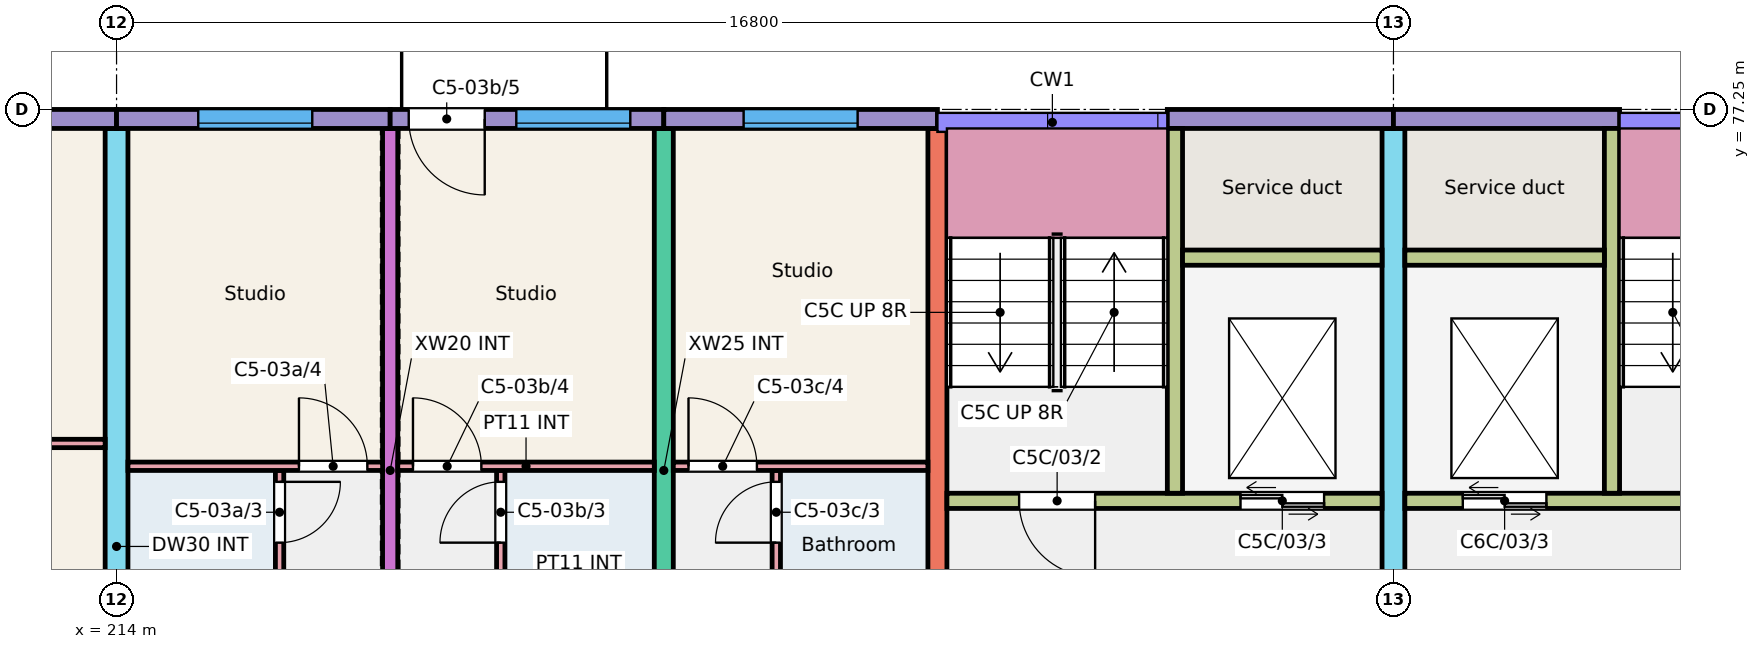
"""IFC4 building model, lengths in metres.
Left out: names, types, materials, properties, quantities, classifications, styles, units other than length and angle.
Written with IfcOpenShell. Run it as: python <this file> out.ifc"""

import sys

from ifc_helpers import new_model, si_unit, direction, frame, frame_2d, origin, place, context, subcontext, project, spatial, rectangle, extrude, element, fill, save


model = new_model("IFC4")
c1 = context("Model", 3, precision=1e-05, world=origin(), true_north=direction((0.0, 1.0)))
c2 = subcontext(c1, "Body", "Model", "MODEL_VIEW")
j1 = project(units=[si_unit("LENGTHUNIT", "METRE"), si_unit("PLANEANGLEUNIT", "RADIAN")], contexts=[c1])
p1 = place(None, origin())
s1 = spatial("IfcSite", under=j1, at=p1, CompositionType="ELEMENT")
p2 = place(p1, origin())
s2 = spatial("IfcBuilding", under=s1, at=p2, CompositionType="ELEMENT")
p3 = place(p2, frame((0.0, 0.0, 9.0)))
s3 = spatial("IfcBuildingStorey", under=s2, at=p3, CompositionType="ELEMENT", Elevation=9.0)
p4 = place(p3, frame((214.0, 66.0, 0.0), z_axis=(0.0, 0.0, 1.0), x_axis=(0.0, 1.0, 0.0)))
e1 = element("IfcWall", 1, at=p4, inside=s3, PredefinedType="SHEAR", context=c2, shape_type="SweptSolid", body=[
    extrude(rectangle(XDim=11.0, YDim=0.3, at=frame_2d((5.5, 0.0))), origin(), (0.0, 0.0, 1.0), 3.0),
])
p5 = place(p4, frame((0.3, 0.0, 0.0)))
e2 = element("IfcOpeningElement", 2, at=p5, cuts=e1, PredefinedType="OPENING", context=c2, shape_type="SweptSolid", body=[
    extrude(rectangle(XDim=1.2, YDim=2.1, at=frame_2d((0.6, 1.05))), frame((0.0, 0.16, 0.0), z_axis=(0.0, -1.0, 0.0), x_axis=(1.0, 0.0, 0.0)), (0.0, 0.0, 1.0), 0.32),
])
p6 = place(p3, frame((217.6, 68.0, 0.0), z_axis=(0.0, 0.0, 1.0), x_axis=(0.0, 1.0, 0.0)))
e3 = element("IfcWall", 3, at=p6, inside=s3, PredefinedType="SHEAR", context=c2, shape_type="SweptSolid", body=[
    extrude(rectangle(XDim=9.0, YDim=0.2, at=frame_2d((4.5, 0.0))), origin(), (0.0, 0.0, 1.0), 3.0),
])
for number, where, z_axis, x_axis in (
    (4, (221.2, 68.0, 0.0), (0.0, 0.0, 1.0), (0.0, 1.0, 0.0)),
    (5, (224.8, 68.0, 0.0), (0.0, 0.0, 1.0), (0.0, 1.0, 0.0)),
):
    element("IfcWall", number, at=place(p3, frame(where, z_axis=z_axis, x_axis=x_axis)), inside=s3, PredefinedType="SHEAR", context=c2, shape_type="SweptSolid", body=[
        extrude(rectangle(XDim=9.0, YDim=0.25, at=frame_2d((4.5, 0.0))), origin(), (0.0, 0.0, 1.0), 3.0),
    ])
p7 = place(p3, frame((230.8, 66.0, 0.0), z_axis=(0.0, 0.0, 1.0), x_axis=(0.0, 1.0, 0.0)))
e6 = element("IfcWall", 6, at=p7, inside=s3, PredefinedType="SHEAR", context=c2, shape_type="SweptSolid", body=[
    extrude(rectangle(XDim=11.0, YDim=0.3, at=frame_2d((5.5, 0.0))), origin(), (0.0, 0.0, 1.0), 3.0),
])
p8 = place(p7, frame((0.3, 0.0, 0.0)))
e7 = element("IfcOpeningElement", 7, at=p8, cuts=e6, PredefinedType="OPENING", context=c2, shape_type="SweptSolid", body=[
    extrude(rectangle(XDim=1.2, YDim=2.1, at=frame_2d((0.6, 1.05))), frame((0.0, 0.16, 0.0), z_axis=(0.0, -1.0, 0.0), x_axis=(1.0, 0.0, 0.0)), (0.0, 0.0, 1.0), 0.32),
])
p9 = place(p3, frame((210.4, 77.125, 0.0), z_axis=(0.0, 0.0, 1.0), x_axis=(1.0, 0.0, 0.0)))
e8 = element("IfcWall", 8, at=p9, inside=s3, PredefinedType="SOLIDWALL", context=c2, shape_type="SweptSolid", body=[
    extrude(rectangle(XDim=3.6, YDim=0.25, at=frame_2d((1.8, 0.0))), origin(), (0.0, 0.0, 1.0), 3.0),
])
p10 = place(p9, frame((1.025, 0.0, 0.9)))
e9 = element("IfcOpeningElement", 9, at=p10, cuts=e8, PredefinedType="OPENING", context=c2, shape_type="SweptSolid", body=[
    extrude(rectangle(XDim=1.5, YDim=1.5, at=frame_2d((0.75, 0.75))), frame((0.0, 0.135, 0.0), z_axis=(0.0, -1.0, 0.0), x_axis=(1.0, 0.0, 0.0)), (0.0, 0.0, 1.0), 0.27),
])
p11 = place(p3, frame((214.0, 77.125, 0.0), z_axis=(0.0, 0.0, 1.0), x_axis=(1.0, 0.0, 0.0)))
e10 = element("IfcWall", 10, at=p11, inside=s3, PredefinedType="SOLIDWALL", context=c2, shape_type="SweptSolid", body=[
    extrude(rectangle(XDim=3.6, YDim=0.25, at=frame_2d((1.8, 0.0))), origin(), (0.0, 0.0, 1.0), 3.0),
])
p12 = place(p11, frame((1.075, 0.0, 0.9)))
e11 = element("IfcOpeningElement", 11, at=p12, cuts=e10, PredefinedType="OPENING", context=c2, shape_type="SweptSolid", body=[
    extrude(rectangle(XDim=1.5, YDim=1.5, at=frame_2d((0.75, 0.75))), frame((0.0, 0.135, 0.0), z_axis=(0.0, -1.0, 0.0), x_axis=(1.0, 0.0, 0.0)), (0.0, 0.0, 1.0), 0.27),
])
p13 = place(p3, frame((217.6, 77.125, 0.0), z_axis=(0.0, 0.0, 1.0), x_axis=(1.0, 0.0, 0.0)))
e12 = element("IfcWall", 12, at=p13, inside=s3, PredefinedType="SOLIDWALL", context=c2, shape_type="SweptSolid", body=[
    extrude(rectangle(XDim=3.6, YDim=0.25, at=frame_2d((1.8, 0.0))), origin(), (0.0, 0.0, 1.0), 3.0),
])
p14 = place(p13, frame((1.659, 0.0, 0.9)))
e13 = element("IfcOpeningElement", 13, at=p14, cuts=e12, PredefinedType="OPENING", context=c2, shape_type="SweptSolid", body=[
    extrude(rectangle(XDim=1.5, YDim=1.5, at=frame_2d((0.75, 0.75))), frame((0.0, 0.135, 0.0), z_axis=(0.0, -1.0, 0.0), x_axis=(1.0, 0.0, 0.0)), (0.0, 0.0, 1.0), 0.27),
])
p15 = place(p13, frame((0.244, 0.0, 0.0)))
e14 = element("IfcOpeningElement", 14, at=p15, cuts=e12, PredefinedType="OPENING", context=c2, shape_type="SweptSolid", body=[
    extrude(rectangle(XDim=1.0, YDim=2.1, at=frame_2d((0.5, 1.05))), frame((0.0, 0.135, 0.0), z_axis=(0.0, -1.0, 0.0), x_axis=(1.0, 0.0, 0.0)), (0.0, 0.0, 1.0), 0.27),
])
p16 = place(p3, frame((221.2, 77.125, 0.0), z_axis=(0.0, 0.0, 1.0), x_axis=(1.0, 0.0, 0.0)))
e15 = element("IfcWall", 15, at=p16, inside=s3, PredefinedType="SOLIDWALL", context=c2, shape_type="SweptSolid", body=[
    extrude(rectangle(XDim=3.6, YDim=0.25, at=frame_2d((1.8, 0.0))), origin(), (0.0, 0.0, 1.0), 3.0),
])
p17 = place(p16, frame((1.05, 0.0, 0.9)))
e16 = element("IfcOpeningElement", 16, at=p17, cuts=e15, PredefinedType="OPENING", context=c2, shape_type="SweptSolid", body=[
    extrude(rectangle(XDim=1.5, YDim=1.5, at=frame_2d((0.75, 0.75))), frame((0.0, 0.135, 0.0), z_axis=(0.0, -1.0, 0.0), x_axis=(1.0, 0.0, 0.0)), (0.0, 0.0, 1.0), 0.27),
])
p18 = place(p3, frame((227.825, 77.125, 0.0), z_axis=(0.0, 0.0, 1.0), x_axis=(1.0, 0.0, 0.0)))
e17 = element("IfcWall", 17, at=p18, inside=s3, PredefinedType="SOLIDWALL", context=c2, shape_type="SweptSolid", body=[
    extrude(rectangle(XDim=2.975, YDim=0.25, at=frame_2d((1.488, 0.0))), origin(), (0.0, 0.0, 1.0), 3.0),
])
p19 = place(p3, frame((224.925, 72.1, 0.0), z_axis=(0.0, 0.0, 1.0), x_axis=(1.0, 0.0, 0.0)))
e18 = element("IfcWall", 18, at=p19, inside=s3, PredefinedType="SHEAR", context=c2, shape_type="SweptSolid", body=[
    extrude(rectangle(XDim=5.725, YDim=0.2, at=frame_2d((2.862, 0.0))), origin(), (0.0, 0.0, 1.0), 3.0),
])
p20 = place(p19, frame((0.95, 0.0, 0.0)))
e19 = element("IfcOpeningElement", 19, at=p20, cuts=e18, PredefinedType="OPENING", context=c2, shape_type="SweptSolid", body=[
    extrude(rectangle(XDim=1.0, YDim=2.1, at=frame_2d((0.5, 1.05))), frame((0.0, 0.11, 0.0), z_axis=(0.0, -1.0, 0.0), x_axis=(1.0, 0.0, 0.0)), (0.0, 0.0, 1.0), 0.22),
])
p21 = place(p19, frame((3.863, 0.0, 0.0)))
e20 = element("IfcOpeningElement", 20, at=p21, cuts=e18, PredefinedType="OPENING", context=c2, shape_type="SweptSolid", body=[
    extrude(rectangle(XDim=1.1, YDim=2.1, at=frame_2d((0.55, 1.05))), frame((0.0, 0.11, 0.0), z_axis=(0.0, -1.0, 0.0), x_axis=(1.0, 0.0, 0.0)), (0.0, 0.0, 1.0), 0.22),
])
p22 = place(p3, frame((227.925, 72.2, 0.0), z_axis=(0.0, 0.0, 1.0), x_axis=(0.0, 1.0, 0.0)))
e21 = element("IfcWall", 21, at=p22, inside=s3, PredefinedType="SHEAR", context=c2, shape_type="SweptSolid", body=[
    extrude(rectangle(XDim=4.8, YDim=0.2, at=frame_2d((2.4, 0.0))), origin(), (0.0, 0.0, 1.0), 3.0),
])
p23 = place(p3, frame((228.025, 75.3, 0.0), z_axis=(0.0, 0.0, 1.0), x_axis=(1.0, 0.0, 0.0)))
e22 = element("IfcWall", 22, at=p23, inside=s3, PredefinedType="SHEAR", context=c2, shape_type="SweptSolid", body=[
    extrude(rectangle(XDim=2.625, YDim=0.2, at=frame_2d((1.312, 0.0))), origin(), (0.0, 0.0, 1.0), 3.0),
])
p24 = place(p3, frame((230.8, 77.125, 0.0), z_axis=(0.0, 0.0, 1.0), x_axis=(1.0, 0.0, 0.0)))
e23 = element("IfcWall", 23, at=p24, inside=s3, PredefinedType="SOLIDWALL", context=c2, shape_type="SweptSolid", body=[
    extrude(rectangle(XDim=2.975, YDim=0.25, at=frame_2d((1.487, 0.0))), origin(), (0.0, 0.0, 1.0), 3.0),
])
p25 = place(p3, frame((230.95, 72.1, 0.0), z_axis=(0.0, 0.0, 1.0), x_axis=(1.0, 0.0, 0.0)))
e24 = element("IfcWall", 24, at=p25, inside=s3, PredefinedType="SHEAR", context=c2, shape_type="SweptSolid", body=[
    extrude(rectangle(XDim=5.725, YDim=0.2, at=frame_2d((2.863, 0.0))), origin(), (0.0, 0.0, 1.0), 3.0),
])
p26 = place(p25, frame((3.775, 0.0, 0.0)))
e25 = element("IfcOpeningElement", 25, at=p26, cuts=e24, PredefinedType="OPENING", context=c2, shape_type="SweptSolid", body=[
    extrude(rectangle(XDim=1.0, YDim=2.1, at=frame_2d((0.5, 1.05))), frame((0.0, 0.11, 0.0), z_axis=(0.0, -1.0, 0.0), x_axis=(1.0, 0.0, 0.0)), (0.0, 0.0, 1.0), 0.22),
])
p27 = place(p25, frame((0.762, 0.0, 0.0)))
e26 = element("IfcOpeningElement", 26, at=p27, cuts=e24, PredefinedType="OPENING", context=c2, shape_type="SweptSolid", body=[
    extrude(rectangle(XDim=1.1, YDim=2.1, at=frame_2d((0.55, 1.05))), frame((0.0, 0.11, 0.0), z_axis=(0.0, -1.0, 0.0), x_axis=(1.0, 0.0, 0.0)), (0.0, 0.0, 1.0), 0.22),
])
p28 = place(p3, frame((233.675, 72.2, 0.0), z_axis=(0.0, 0.0, 1.0), x_axis=(0.0, 1.0, 0.0)))
e27 = element("IfcWall", 27, at=p28, inside=s3, PredefinedType="SHEAR", context=c2, shape_type="SweptSolid", body=[
    extrude(rectangle(XDim=4.8, YDim=0.2, at=frame_2d((2.4, 0.0))), origin(), (0.0, 0.0, 1.0), 3.0),
])
p29 = place(p3, frame((230.95, 75.3, 0.0), z_axis=(0.0, 0.0, 1.0), x_axis=(1.0, 0.0, 0.0)))
e28 = element("IfcWall", 28, at=p29, inside=s3, PredefinedType="SHEAR", context=c2, shape_type="SweptSolid", body=[
    extrude(rectangle(XDim=2.625, YDim=0.2, at=frame_2d((1.312, 0.0))), origin(), (0.0, 0.0, 1.0), 3.0),
])
p30 = place(p3, frame((210.5, 72.855, 0.0), z_axis=(0.0, 0.0, 1.0), x_axis=(1.0, 0.0, 0.0)))
e29 = element("IfcWall", 29, at=p30, inside=s3, PredefinedType="PARTITIONING", context=c2, shape_type="SweptSolid", body=[
    extrude(rectangle(XDim=3.35, YDim=0.11, at=frame_2d((1.675, 0.0))), origin(), (0.0, 0.0, 1.0), 2.8),
])
p31 = place(p3, frame((216.145, 68.0, 0.0), z_axis=(0.0, 0.0, 1.0), x_axis=(0.0, 1.0, 0.0)))
e30 = element("IfcWall", 30, at=p31, inside=s3, PredefinedType="PARTITIONING", context=c2, shape_type="SweptSolid", body=[
    extrude(rectangle(XDim=4.5, YDim=0.11, at=frame_2d((2.25, 0.0))), origin(), (0.0, 0.0, 1.0), 2.8),
])
p32 = place(p31, frame((0.2, 0.0, 0.0)))
e31 = element("IfcOpeningElement", 31, at=p32, cuts=e30, PredefinedType="OPENING", context=c2, shape_type="SweptSolid", body=[
    extrude(rectangle(XDim=0.8, YDim=2.1, at=frame_2d((0.4, 1.05))), frame((0.0, 0.065, 0.0), z_axis=(0.0, -1.0, 0.0), x_axis=(1.0, 0.0, 0.0)), (0.0, 0.0, 1.0), 0.13),
])
p33 = place(p31, frame((3.55, 0.0, 0.0)))
e32 = element("IfcOpeningElement", 32, at=p33, cuts=e30, PredefinedType="OPENING", context=c2, shape_type="SweptSolid", body=[
    extrude(rectangle(XDim=0.8, YDim=2.1, at=frame_2d((0.4, 1.05))), frame((0.0, 0.065, 0.0), z_axis=(0.0, -1.0, 0.0), x_axis=(1.0, 0.0, 0.0)), (0.0, 0.0, 1.0), 0.13),
])
p34 = place(p3, frame((214.15, 72.555, 0.0), z_axis=(0.0, 0.0, 1.0), x_axis=(1.0, 0.0, 0.0)))
e33 = element("IfcWall", 33, at=p34, inside=s3, PredefinedType="PARTITIONING", context=c2, shape_type="SweptSolid", body=[
    extrude(rectangle(XDim=3.35, YDim=0.11, at=frame_2d((1.675, 0.0))), origin(), (0.0, 0.0, 1.0), 2.8),
])
p35 = place(p34, frame((2.25, 0.0, 0.0)))
e34 = element("IfcOpeningElement", 34, at=p35, cuts=e33, PredefinedType="OPENING", context=c2, shape_type="SweptSolid", body=[
    extrude(rectangle(XDim=0.9, YDim=2.1, at=frame_2d((0.45, 1.05))), frame((0.0, 0.065, 0.0), z_axis=(0.0, -1.0, 0.0), x_axis=(1.0, 0.0, 0.0)), (0.0, 0.0, 1.0), 0.13),
])
p36 = place(p3, frame((219.055, 68.0, 0.0), z_axis=(0.0, 0.0, 1.0), x_axis=(0.0, 1.0, 0.0)))
e35 = element("IfcWall", 35, at=p36, inside=s3, PredefinedType="PARTITIONING", context=c2, shape_type="SweptSolid", body=[
    extrude(rectangle(XDim=4.5, YDim=0.11, at=frame_2d((2.25, 0.0))), origin(), (0.0, 0.0, 1.0), 2.8),
])
p37 = place(p36, frame((0.2, 0.0, 0.0)))
e36 = element("IfcOpeningElement", 36, at=p37, cuts=e35, PredefinedType="OPENING", context=c2, shape_type="SweptSolid", body=[
    extrude(rectangle(XDim=0.8, YDim=2.1, at=frame_2d((0.4, 1.05))), frame((0.0, 0.065, 0.0), z_axis=(0.0, -1.0, 0.0), x_axis=(1.0, 0.0, 0.0)), (0.0, 0.0, 1.0), 0.13),
])
p38 = place(p36, frame((3.55, 0.0, 0.0)))
e37 = element("IfcOpeningElement", 37, at=p38, cuts=e35, PredefinedType="OPENING", context=c2, shape_type="SweptSolid", body=[
    extrude(rectangle(XDim=0.8, YDim=2.1, at=frame_2d((0.4, 1.05))), frame((0.0, 0.065, 0.0), z_axis=(0.0, -1.0, 0.0), x_axis=(1.0, 0.0, 0.0)), (0.0, 0.0, 1.0), 0.13),
])
p39 = place(p3, frame((217.7, 72.555, 0.0), z_axis=(0.0, 0.0, 1.0), x_axis=(1.0, 0.0, 0.0)))
e38 = element("IfcWall", 38, at=p39, inside=s3, PredefinedType="PARTITIONING", context=c2, shape_type="SweptSolid", body=[
    extrude(rectangle(XDim=3.375, YDim=0.11, at=frame_2d((1.688, 0.0))), origin(), (0.0, 0.0, 1.0), 2.8),
])
p40 = place(p39, frame((0.2, 0.0, 0.0)))
e39 = element("IfcOpeningElement", 39, at=p40, cuts=e38, PredefinedType="OPENING", context=c2, shape_type="SweptSolid", body=[
    extrude(rectangle(XDim=0.9, YDim=2.1, at=frame_2d((0.45, 1.05))), frame((0.0, 0.065, 0.0), z_axis=(0.0, -1.0, 0.0), x_axis=(1.0, 0.0, 0.0)), (0.0, 0.0, 1.0), 0.13),
])
p41 = place(p3, frame((222.68, 68.0, 0.0), z_axis=(0.0, 0.0, 1.0), x_axis=(0.0, 1.0, 0.0)))
e40 = element("IfcWall", 40, at=p41, inside=s3, PredefinedType="PARTITIONING", context=c2, shape_type="SweptSolid", body=[
    extrude(rectangle(XDim=4.5, YDim=0.11, at=frame_2d((2.25, 0.0))), origin(), (0.0, 0.0, 1.0), 2.8),
])
p42 = place(p41, frame((0.2, 0.0, 0.0)))
e41 = element("IfcOpeningElement", 41, at=p42, cuts=e40, PredefinedType="OPENING", context=c2, shape_type="SweptSolid", body=[
    extrude(rectangle(XDim=0.8, YDim=2.1, at=frame_2d((0.4, 1.05))), frame((0.0, 0.065, 0.0), z_axis=(0.0, -1.0, 0.0), x_axis=(1.0, 0.0, 0.0)), (0.0, 0.0, 1.0), 0.13),
])
p43 = place(p41, frame((3.55, 0.0, 0.0)))
e42 = element("IfcOpeningElement", 42, at=p43, cuts=e40, PredefinedType="OPENING", context=c2, shape_type="SweptSolid", body=[
    extrude(rectangle(XDim=0.8, YDim=2.1, at=frame_2d((0.4, 1.05))), frame((0.0, 0.065, 0.0), z_axis=(0.0, -1.0, 0.0), x_axis=(1.0, 0.0, 0.0)), (0.0, 0.0, 1.0), 0.13),
])
p44 = place(p3, frame((221.325, 72.555, 0.0), z_axis=(0.0, 0.0, 1.0), x_axis=(1.0, 0.0, 0.0)))
e43 = element("IfcWall", 43, at=p44, inside=s3, PredefinedType="PARTITIONING", context=c2, shape_type="SweptSolid", body=[
    extrude(rectangle(XDim=3.35, YDim=0.11, at=frame_2d((1.675, 0.0))), origin(), (0.0, 0.0, 1.0), 2.8),
])
p45 = place(p44, frame((0.2, 0.0, 0.0)))
e44 = element("IfcOpeningElement", 44, at=p45, cuts=e43, PredefinedType="OPENING", context=c2, shape_type="SweptSolid", body=[
    extrude(rectangle(XDim=0.9, YDim=2.1, at=frame_2d((0.45, 1.05))), frame((0.0, 0.065, 0.0), z_axis=(0.0, -1.0, 0.0), x_axis=(1.0, 0.0, 0.0)), (0.0, 0.0, 1.0), 0.13),
])
p46 = place(p12, origin())
e45 = element("IfcWindow", 45, at=p46, inside=s3, PartitioningType="SINGLE_PANEL", PredefinedType="WINDOW", context=c2, shape_type="SweptSolid", body=[
    extrude(rectangle(XDim=1.5, YDim=1.5, at=frame_2d((0.75, 0.75))), frame((0.0, -0.025, 0.0), z_axis=(0.0, -1.0, 0.0), x_axis=(1.0, 0.0, 0.0)), (0.0, 0.0, 1.0), 0.06),
])
fill(e11, e45)
p47 = place(p14, origin())
e46 = element("IfcWindow", 46, at=p47, inside=s3, PartitioningType="SINGLE_PANEL", PredefinedType="WINDOW", context=c2, shape_type="SweptSolid", body=[
    extrude(rectangle(XDim=1.5, YDim=1.5, at=frame_2d((0.75, 0.75))), frame((0.0, -0.025, 0.0), z_axis=(0.0, -1.0, 0.0), x_axis=(1.0, 0.0, 0.0)), (0.0, 0.0, 1.0), 0.06),
])
fill(e13, e46)
p48 = place(p17, origin())
e47 = element("IfcWindow", 47, at=p48, inside=s3, PartitioningType="SINGLE_PANEL", PredefinedType="WINDOW", context=c2, shape_type="SweptSolid", body=[
    extrude(rectangle(XDim=1.5, YDim=1.5, at=frame_2d((0.75, 0.75))), frame((0.0, -0.025, 0.0), z_axis=(0.0, -1.0, 0.0), x_axis=(1.0, 0.0, 0.0)), (0.0, 0.0, 1.0), 0.06),
])
fill(e16, e47)
p49 = place(p33, origin())
e48 = element("IfcDoor", 48, at=p49, inside=s3, OperationType="SINGLE_SWING_RIGHT", PredefinedType="DOOR", context=c2, shape_type="SweptSolid", body=[
    extrude(rectangle(XDim=0.8, YDim=2.1, at=frame_2d((0.4, 1.05))), frame((0.0, 0.025, 0.0), z_axis=(0.0, -1.0, 0.0), x_axis=(1.0, 0.0, 0.0)), (0.0, 0.0, 1.0), 0.05),
])
fill(e32, e48)
p50 = place(p35, origin())
e49 = element("IfcDoor", 49, at=p50, inside=s3, OperationType="SINGLE_SWING_LEFT", PredefinedType="DOOR", context=c2, shape_type="SweptSolid", body=[
    extrude(rectangle(XDim=0.9, YDim=2.1, at=frame_2d((0.45, 1.05))), frame((0.0, 0.025, 0.0), z_axis=(0.0, -1.0, 0.0), x_axis=(1.0, 0.0, 0.0)), (0.0, 0.0, 1.0), 0.05),
])
fill(e34, e49)
p51 = place(p38, origin())
e50 = element("IfcDoor", 50, at=p51, inside=s3, OperationType="SINGLE_SWING_LEFT", PredefinedType="DOOR", context=c2, shape_type="SweptSolid", body=[
    extrude(rectangle(XDim=0.8, YDim=2.1, at=frame_2d((0.4, 1.05))), frame((0.0, 0.025, 0.0), z_axis=(0.0, -1.0, 0.0), x_axis=(1.0, 0.0, 0.0)), (0.0, 0.0, 1.0), 0.05),
])
fill(e37, e50)
p52 = place(p40, origin())
e51 = element("IfcDoor", 51, at=p52, inside=s3, OperationType="SINGLE_SWING_LEFT", PredefinedType="DOOR", context=c2, shape_type="SweptSolid", body=[
    extrude(rectangle(XDim=0.9, YDim=2.1, at=frame_2d((0.45, 1.05))), frame((0.0, 0.025, 0.0), z_axis=(0.0, -1.0, 0.0), x_axis=(1.0, 0.0, 0.0)), (0.0, 0.0, 1.0), 0.05),
])
fill(e39, e51)
p53 = place(p15, origin())
e52 = element("IfcDoor", 52, at=p53, inside=s3, OperationType="SINGLE_SWING_RIGHT", PredefinedType="DOOR", context=c2, shape_type="SweptSolid", body=[
    extrude(rectangle(XDim=1.0, YDim=2.1, at=frame_2d((0.5, 1.05))), frame((0.0, 0.025, 0.0), z_axis=(0.0, -1.0, 0.0), x_axis=(1.0, 0.0, 0.0)), (0.0, 0.0, 1.0), 0.05),
])
fill(e14, e52)
p54 = place(p43, origin())
e53 = element("IfcDoor", 53, at=p54, inside=s3, OperationType="SINGLE_SWING_LEFT", PredefinedType="DOOR", context=c2, shape_type="SweptSolid", body=[
    extrude(rectangle(XDim=0.8, YDim=2.1, at=frame_2d((0.4, 1.05))), frame((0.0, 0.025, 0.0), z_axis=(0.0, -1.0, 0.0), x_axis=(1.0, 0.0, 0.0)), (0.0, 0.0, 1.0), 0.05),
])
fill(e42, e53)
p55 = place(p45, origin())
e54 = element("IfcDoor", 54, at=p55, inside=s3, OperationType="SINGLE_SWING_LEFT", PredefinedType="DOOR", context=c2, shape_type="SweptSolid", body=[
    extrude(rectangle(XDim=0.9, YDim=2.1, at=frame_2d((0.45, 1.05))), frame((0.0, 0.025, 0.0), z_axis=(0.0, -1.0, 0.0), x_axis=(1.0, 0.0, 0.0)), (0.0, 0.0, 1.0), 0.05),
])
fill(e44, e54)
p56 = place(p20, origin())
e55 = element("IfcDoor", 55, at=p56, inside=s3, OperationType="SINGLE_SWING_RIGHT", PredefinedType="DOOR", context=c2, shape_type="SweptSolid", body=[
    extrude(rectangle(XDim=1.0, YDim=2.1, at=frame_2d((0.5, 1.05))), frame((0.0, 0.025, 0.0), z_axis=(0.0, -1.0, 0.0), x_axis=(1.0, 0.0, 0.0)), (0.0, 0.0, 1.0), 0.05),
])
fill(e19, e55)
p57 = place(p21, origin())
e56 = element("IfcDoor", 56, at=p57, inside=s3, OperationType="DOUBLE_DOOR_SLIDING", PredefinedType="DOOR", context=c2, shape_type="SweptSolid", body=[
    extrude(rectangle(XDim=1.1, YDim=2.1, at=frame_2d((0.55, 1.05))), frame((0.0, 0.025, 0.0), z_axis=(0.0, -1.0, 0.0), x_axis=(1.0, 0.0, 0.0)), (0.0, 0.0, 1.0), 0.05),
])
fill(e20, e56)
p58 = place(p27, origin())
e57 = element("IfcDoor", 57, at=p58, inside=s3, OperationType="DOUBLE_DOOR_SLIDING", PredefinedType="DOOR", context=c2, shape_type="SweptSolid", body=[
    extrude(rectangle(XDim=1.1, YDim=2.1, at=frame_2d((0.55, 1.05))), frame((0.0, 0.025, 0.0), z_axis=(0.0, -1.0, 0.0), x_axis=(1.0, 0.0, 0.0)), (0.0, 0.0, 1.0), 0.05),
])
fill(e26, e57)
save(model, sys.argv[1])
